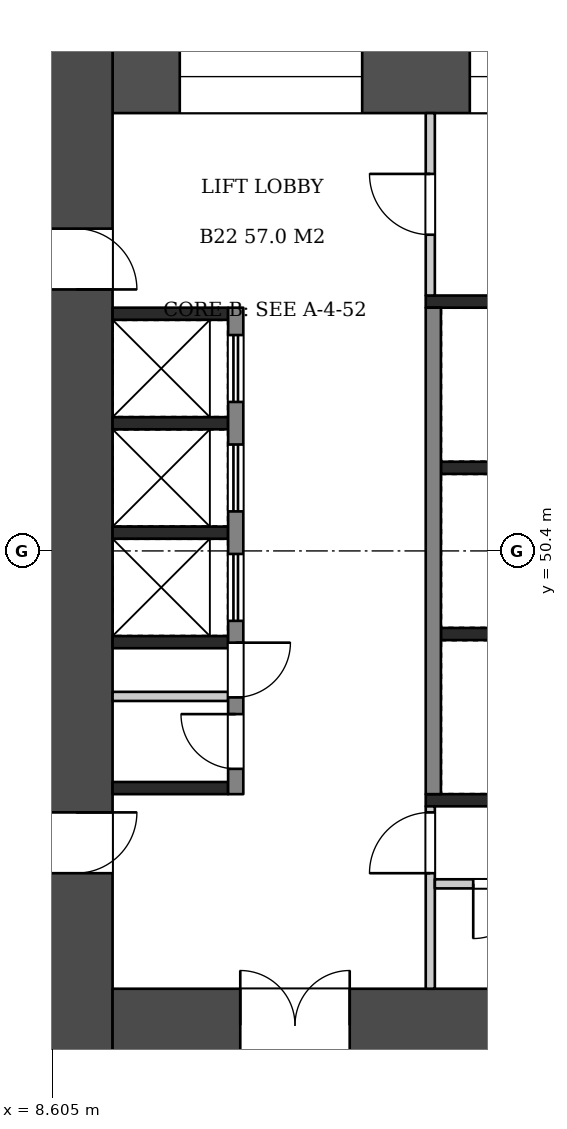
"""IFC4 building model, lengths in metres.
Left out: names, types, materials, properties, quantities, classifications, styles, units other than length and angle.
Written with IfcOpenShell. Run it as: python <this file> out.ifc"""

import sys

from ifc_helpers import new_model, si_unit, direction, frame, frame_2d, origin, place, context, subcontext, project, spatial, rectangle, extrude, element, fill, save


model = new_model("IFC4")
c1 = context("Model", 3, precision=1e-05, world=origin(), true_north=direction((0.0, 1.0)))
c2 = subcontext(c1, "Body", "Model", "MODEL_VIEW")
j1 = project(units=[si_unit("LENGTHUNIT", "METRE"), si_unit("PLANEANGLEUNIT", "RADIAN")], contexts=[c1])
p1 = place(None, origin())
s1 = spatial("IfcSite", under=j1, at=p1, CompositionType="ELEMENT")
p2 = place(p1, origin())
s2 = spatial("IfcBuilding", under=s1, at=p2, CompositionType="ELEMENT")
p3 = place(p2, frame((0.0, 0.0, 91.7)))
s3 = spatial("IfcBuildingStorey", under=s2, at=p3, CompositionType="ELEMENT", Elevation=91.7)
p4 = place(p3, frame((9.0, 58.8, 0.0), z_axis=(0.0, 0.0, 1.0), x_axis=(0.0, -1.0, 0.0)))
e1 = element("IfcWall", 1, at=p4, inside=s3, PredefinedType="SHEAR", context=c2, shape_type="SweptSolid", body=[
    extrude(rectangle(XDim=16.8, YDim=1.2, at=frame_2d((8.4, 0.0))), origin(), (0.0, 0.0, 1.0), 3.22),
])
p5 = place(p4, frame((3.1, 0.0, 0.0)))
e2 = element("IfcOpeningElement", 2, at=p5, cuts=e1, PredefinedType="OPENING", context=c2, shape_type="SweptSolid", body=[
    extrude(rectangle(XDim=1.0, YDim=2.1, at=frame_2d((0.5, 1.05))), frame((0.0, 0.61, 0.0), z_axis=(0.0, -1.0, 0.0), x_axis=(1.0, 0.0, 0.0)), (0.0, 0.0, 1.0), 1.22),
])
p6 = place(p4, frame((12.7, 0.0, 0.0)))
e3 = element("IfcOpeningElement", 3, at=p6, cuts=e1, PredefinedType="OPENING", context=c2, shape_type="SweptSolid", body=[
    extrude(rectangle(XDim=1.0, YDim=2.1, at=frame_2d((0.5, 1.05))), frame((0.0, 0.61, 0.0), z_axis=(0.0, -1.0, 0.0), x_axis=(1.0, 0.0, 0.0)), (0.0, 0.0, 1.0), 1.22),
])
p7 = place(p3, frame((9.6, 58.2, 0.0), z_axis=(0.0, 0.0, 1.0), x_axis=(1.0, 0.0, 0.0)))
e4 = element("IfcWall", 4, at=p7, inside=s3, PredefinedType="SHEAR", context=c2, shape_type="SweptSolid", body=[
    extrude(rectangle(XDim=14.4, YDim=1.2, at=frame_2d((7.2, 0.0))), origin(), (0.0, 0.0, 1.0), 3.22),
])
p8 = place(p7, frame((1.105, 0.0, 0.6)))
e5 = element("IfcOpeningElement", 5, at=p8, cuts=e4, PredefinedType="OPENING", context=c2, shape_type="SweptSolid", body=[
    extrude(rectangle(XDim=3.0, YDim=2.1, at=frame_2d((1.5, 1.05))), frame((0.0, 0.61, 0.0), z_axis=(0.0, -1.0, 0.0), x_axis=(1.0, 0.0, 0.0)), (0.0, 0.0, 1.0), 1.22),
])
p9 = place(p7, frame((5.875, 0.0, 0.6)))
e6 = element("IfcOpeningElement", 6, at=p9, cuts=e4, PredefinedType="OPENING", context=c2, shape_type="SweptSolid", body=[
    extrude(rectangle(XDim=2.4, YDim=2.1, at=frame_2d((1.2, 1.05))), frame((0.0, 0.61, 0.0), z_axis=(0.0, -1.0, 0.0), x_axis=(1.0, 0.0, 0.0)), (0.0, 0.0, 1.0), 1.22),
])
p10 = place(p7, frame((9.993, 0.0, 0.5)))
e7 = element("IfcOpeningElement", 7, at=p10, cuts=e4, PredefinedType="OPENING", context=c2, shape_type="SweptSolid", body=[
    extrude(rectangle(XDim=1.2, YDim=2.4, at=frame_2d((0.6, 1.2))), frame((0.0, 0.61, 0.0), z_axis=(0.0, -1.0, 0.0), x_axis=(1.0, 0.0, 0.0)), (0.0, 0.0, 1.0), 1.22),
])
p11 = place(p7, frame((12.197, 0.0, 0.5)))
e8 = element("IfcOpeningElement", 8, at=p11, cuts=e4, PredefinedType="OPENING", context=c2, shape_type="SweptSolid", body=[
    extrude(rectangle(XDim=1.2, YDim=2.4, at=frame_2d((0.6, 1.2))), frame((0.0, 0.61, 0.0), z_axis=(0.0, -1.0, 0.0), x_axis=(1.0, 0.0, 0.0)), (0.0, 0.0, 1.0), 1.22),
])
p12 = place(p3, frame((9.6, 42.6, 0.0), z_axis=(0.0, 0.0, 1.0), x_axis=(1.0, 0.0, 0.0)))
e9 = element("IfcWall", 9, at=p12, inside=s3, PredefinedType="SHEAR", context=c2, shape_type="SweptSolid", body=[
    extrude(rectangle(XDim=14.4, YDim=1.2, at=frame_2d((7.2, 0.0))), origin(), (0.0, 0.0, 1.0), 3.22),
])
p13 = place(p12, frame((2.1, 0.0, 0.0)))
e10 = element("IfcOpeningElement", 10, at=p13, cuts=e9, PredefinedType="OPENING", context=c2, shape_type="SweptSolid", body=[
    extrude(rectangle(XDim=1.8, YDim=2.1, at=frame_2d((0.9, 1.05))), frame((0.0, 0.61, 0.0), z_axis=(0.0, -1.0, 0.0), x_axis=(1.0, 0.0, 0.0)), (0.0, 0.0, 1.0), 1.22),
])
for number, where, z_axis, x_axis in (
    (11, (9.6, 54.3, 0.0), (0.0, 0.0, 1.0), (1.0, 0.0, 0.0)),
    (12, (9.6, 52.5, 0.0), (0.0, 0.0, 1.0), (1.0, 0.0, 0.0)),
    (13, (9.6, 50.7, 0.0), (0.0, 0.0, 1.0), (1.0, 0.0, 0.0)),
    (14, (9.6, 48.9, 0.0), (0.0, 0.0, 1.0), (1.0, 0.0, 0.0)),
    (15, (9.6, 46.5, 0.0), (0.0, 0.0, 1.0), (1.0, 0.0, 0.0)),
):
    element("IfcWall", number, at=place(p3, frame(where, z_axis=z_axis, x_axis=x_axis)), inside=s3, PredefinedType="SHEAR", context=c2, shape_type="SweptSolid", body=[
        extrude(rectangle(XDim=1.9, YDim=0.2, at=frame_2d((0.95, 0.0))), origin(), (0.0, 0.0, 1.0), 3.22),
    ])
p14 = place(p3, frame((9.6, 48.008, 0.0), z_axis=(0.0, 0.0, 1.0), x_axis=(1.0, 0.0, 0.0)))
e16 = element("IfcWall", 16, at=p14, inside=s3, PredefinedType="PARTITIONING", context=c2, shape_type="SweptSolid", body=[
    extrude(rectangle(XDim=1.9, YDim=0.15, at=frame_2d((0.95, 0.0))), origin(), (0.0, 0.0, 1.0), 3.22),
])
p15 = place(p3, frame((11.625, 54.4, 0.0), z_axis=(0.0, 0.0, 1.0), x_axis=(0.0, -1.0, 0.0)))
e17 = element("IfcWall", 17, at=p15, inside=s3, PredefinedType="SHEAR", context=c2, shape_type="SweptSolid", body=[
    extrude(rectangle(XDim=8.0, YDim=0.25, at=frame_2d((4.0, 0.0))), origin(), (0.0, 0.0, 1.0), 3.22),
])
p16 = place(p15, frame((0.45, 0.0, 0.0)))
e18 = element("IfcOpeningElement", 18, at=p16, cuts=e17, PredefinedType="OPENING", context=c2, shape_type="SweptSolid", body=[
    extrude(rectangle(XDim=1.1, YDim=2.1, at=frame_2d((0.55, 1.05))), frame((0.0, 0.135, 0.0), z_axis=(0.0, -1.0, 0.0), x_axis=(1.0, 0.0, 0.0)), (0.0, 0.0, 1.0), 0.27),
])
p17 = place(p15, frame((2.25, 0.0, 0.0)))
e19 = element("IfcOpeningElement", 19, at=p17, cuts=e17, PredefinedType="OPENING", context=c2, shape_type="SweptSolid", body=[
    extrude(rectangle(XDim=1.1, YDim=2.1, at=frame_2d((0.55, 1.05))), frame((0.0, 0.135, 0.0), z_axis=(0.0, -1.0, 0.0), x_axis=(1.0, 0.0, 0.0)), (0.0, 0.0, 1.0), 0.27),
])
p18 = place(p15, frame((4.05, 0.0, 0.0)))
e20 = element("IfcOpeningElement", 20, at=p18, cuts=e17, PredefinedType="OPENING", context=c2, shape_type="SweptSolid", body=[
    extrude(rectangle(XDim=1.1, YDim=2.1, at=frame_2d((0.55, 1.05))), frame((0.0, 0.135, 0.0), z_axis=(0.0, -1.0, 0.0), x_axis=(1.0, 0.0, 0.0)), (0.0, 0.0, 1.0), 0.27),
])
p19 = place(p15, frame((5.509, 0.0, 0.0)))
e21 = element("IfcOpeningElement", 21, at=p19, cuts=e17, PredefinedType="OPENING", context=c2, shape_type="SweptSolid", body=[
    extrude(rectangle(XDim=0.9, YDim=2.1, at=frame_2d((0.45, 1.05))), frame((0.0, 0.135, 0.0), z_axis=(0.0, -1.0, 0.0), x_axis=(1.0, 0.0, 0.0)), (0.0, 0.0, 1.0), 0.27),
])
p20 = place(p15, frame((6.684, 0.0, 0.0)))
e22 = element("IfcOpeningElement", 22, at=p20, cuts=e17, PredefinedType="OPENING", context=c2, shape_type="SweptSolid", body=[
    extrude(rectangle(XDim=0.9, YDim=2.1, at=frame_2d((0.45, 1.05))), frame((0.0, 0.135, 0.0), z_axis=(0.0, -1.0, 0.0), x_axis=(1.0, 0.0, 0.0)), (0.0, 0.0, 1.0), 0.27),
])
for number, where, z_axis, x_axis in (
    (23, (15.0, 51.767, 0.0), (0.0, 0.0, 1.0), (1.0, 0.0, 0.0)),
    (24, (15.0, 49.033, 0.0), (0.0, 0.0, 1.0), (1.0, 0.0, 0.0)),
):
    element("IfcWall", number, at=place(p3, frame(where, z_axis=z_axis, x_axis=x_axis)), inside=s3, PredefinedType="SHEAR", context=c2, shape_type="SweptSolid", body=[
        extrude(rectangle(XDim=1.9, YDim=0.2, at=frame_2d((0.95, 0.0))), origin(), (0.0, 0.0, 1.0), 3.22),
    ])
p21 = place(p3, frame((14.875, 54.4, 0.0), z_axis=(0.0, 0.0, 1.0), x_axis=(0.0, -1.0, 0.0)))
e25 = element("IfcWall", 25, at=p21, inside=s3, PredefinedType="SHEAR", context=c2, shape_type="SweptSolid", body=[
    extrude(rectangle(XDim=8.0, YDim=0.25, at=frame_2d((4.0, 0.0))), origin(), (0.0, 0.0, 1.0), 3.22),
])
p22 = place(p3, frame((14.75, 54.5, 0.0), z_axis=(0.0, 0.0, 1.0), x_axis=(1.0, 0.0, 0.0)))
e26 = element("IfcWall", 26, at=p22, inside=s3, PredefinedType="SHEAR", context=c2, shape_type="SweptSolid", body=[
    extrude(rectangle(XDim=2.4, YDim=0.2, at=frame_2d((1.2, 0.0))), origin(), (0.0, 0.0, 1.0), 3.22),
])
p23 = place(p3, frame((14.825, 57.6, 0.0), z_axis=(0.0, 0.0, 1.0), x_axis=(0.0, -1.0, 0.0)))
e27 = element("IfcWall", 27, at=p23, inside=s3, PredefinedType="PARTITIONING", context=c2, shape_type="SweptSolid", body=[
    extrude(rectangle(XDim=3.0, YDim=0.15, at=frame_2d((1.5, 0.0))), origin(), (0.0, 0.0, 1.0), 3.22),
])
p24 = place(p23, frame((1.0, 0.0, 0.0)))
e28 = element("IfcOpeningElement", 28, at=p24, cuts=e27, PredefinedType="OPENING", context=c2, shape_type="SweptSolid", body=[
    extrude(rectangle(XDim=1.0, YDim=2.1, at=frame_2d((0.5, 1.05))), frame((0.0, 0.085, 0.0), z_axis=(0.0, -1.0, 0.0), x_axis=(1.0, 0.0, 0.0)), (0.0, 0.0, 1.0), 0.17),
])
p25 = place(p3, frame((14.75, 46.3, 0.0), z_axis=(0.0, 0.0, 1.0), x_axis=(1.0, 0.0, 0.0)))
e29 = element("IfcWall", 29, at=p25, inside=s3, PredefinedType="SHEAR", context=c2, shape_type="SweptSolid", body=[
    extrude(rectangle(XDim=9.25, YDim=0.2, at=frame_2d((4.625, 0.0))), origin(), (0.0, 0.0, 1.0), 3.22),
])
p26 = place(p3, frame((14.825, 46.2, 0.0), z_axis=(0.0, 0.0, 1.0), x_axis=(0.0, -1.0, 0.0)))
e30 = element("IfcWall", 30, at=p26, inside=s3, PredefinedType="PARTITIONING", context=c2, shape_type="SweptSolid", body=[
    extrude(rectangle(XDim=3.0, YDim=0.15, at=frame_2d((1.5, 0.0))), origin(), (0.0, 0.0, 1.0), 3.22),
])
p27 = place(p26, frame((0.1, 0.0, 0.0)))
e31 = element("IfcOpeningElement", 31, at=p27, cuts=e30, PredefinedType="OPENING", context=c2, shape_type="SweptSolid", body=[
    extrude(rectangle(XDim=1.0, YDim=2.1, at=frame_2d((0.5, 1.05))), frame((0.0, 0.085, 0.0), z_axis=(0.0, -1.0, 0.0), x_axis=(1.0, 0.0, 0.0)), (0.0, 0.0, 1.0), 0.17),
])
p28 = place(p3, frame((14.9, 44.925, 0.0), z_axis=(0.0, 0.0, 1.0), x_axis=(1.0, 0.0, 0.0)))
e32 = element("IfcWall", 32, at=p28, inside=s3, PredefinedType="PARTITIONING", context=c2, shape_type="SweptSolid", body=[
    extrude(rectangle(XDim=9.1, YDim=0.15, at=frame_2d((4.55, 0.0))), origin(), (0.0, 0.0, 1.0), 3.22),
])
p29 = place(p28, frame((0.631, 0.0, 0.0)))
e33 = element("IfcOpeningElement", 33, at=p29, cuts=e32, PredefinedType="OPENING", context=c2, shape_type="SweptSolid", body=[
    extrude(rectangle(XDim=0.9, YDim=2.1, at=frame_2d((0.45, 1.05))), frame((0.0, 0.085, 0.0), z_axis=(0.0, -1.0, 0.0), x_axis=(1.0, 0.0, 0.0)), (0.0, 0.0, 1.0), 0.17),
])
p30 = place(p28, frame((2.944, 0.0, 0.0)))
e34 = element("IfcOpeningElement", 34, at=p30, cuts=e32, PredefinedType="OPENING", context=c2, shape_type="SweptSolid", body=[
    extrude(rectangle(XDim=0.9, YDim=2.1, at=frame_2d((0.45, 1.05))), frame((0.0, 0.085, 0.0), z_axis=(0.0, -1.0, 0.0), x_axis=(1.0, 0.0, 0.0)), (0.0, 0.0, 1.0), 0.17),
])
p31 = place(p28, frame((5.256, 0.0, 0.0)))
e35 = element("IfcOpeningElement", 35, at=p31, cuts=e32, PredefinedType="OPENING", context=c2, shape_type="SweptSolid", body=[
    extrude(rectangle(XDim=0.9, YDim=2.1, at=frame_2d((0.45, 1.05))), frame((0.0, 0.085, 0.0), z_axis=(0.0, -1.0, 0.0), x_axis=(1.0, 0.0, 0.0)), (0.0, 0.0, 1.0), 0.17),
])
p32 = place(p28, frame((7.569, 0.0, 0.0)))
e36 = element("IfcOpeningElement", 36, at=p32, cuts=e32, PredefinedType="OPENING", context=c2, shape_type="SweptSolid", body=[
    extrude(rectangle(XDim=0.9, YDim=2.1, at=frame_2d((0.45, 1.05))), frame((0.0, 0.085, 0.0), z_axis=(0.0, -1.0, 0.0), x_axis=(1.0, 0.0, 0.0)), (0.0, 0.0, 1.0), 0.17),
])
p33 = place(p5, origin())
e37 = element("IfcDoor", 37, at=p33, inside=s3, OperationType="SINGLE_SWING_RIGHT", PredefinedType="DOOR", context=c2, shape_type="SweptSolid", body=[
    extrude(rectangle(XDim=1.0, YDim=2.1, at=frame_2d((0.5, 1.05))), frame((0.0, 0.025, 0.0), z_axis=(0.0, -1.0, 0.0), x_axis=(1.0, 0.0, 0.0)), (0.0, 0.0, 1.0), 0.05),
])
fill(e2, e37)
p34 = place(p6, origin())
e38 = element("IfcDoor", 38, at=p34, inside=s3, OperationType="SINGLE_SWING_LEFT", PredefinedType="DOOR", context=c2, shape_type="SweptSolid", body=[
    extrude(rectangle(XDim=1.0, YDim=2.1, at=frame_2d((0.5, 1.05))), frame((0.0, 0.025, 0.0), z_axis=(0.0, -1.0, 0.0), x_axis=(1.0, 0.0, 0.0)), (0.0, 0.0, 1.0), 0.05),
])
fill(e3, e38)
p35 = place(p13, origin())
e39 = element("IfcDoor", 39, at=p35, inside=s3, OperationType="DOUBLE_DOOR_SINGLE_SWING", PredefinedType="DOOR", context=c2, shape_type="SweptSolid", body=[
    extrude(rectangle(XDim=1.8, YDim=2.1, at=frame_2d((0.9, 1.05))), frame((0.0, 0.025, 0.0), z_axis=(0.0, -1.0, 0.0), x_axis=(1.0, 0.0, 0.0)), (0.0, 0.0, 1.0), 0.05),
])
fill(e10, e39)
p36 = place(p16, origin())
e40 = element("IfcDoor", 40, at=p36, inside=s3, OperationType="DOUBLE_DOOR_SLIDING", PredefinedType="DOOR", context=c2, shape_type="SweptSolid", body=[
    extrude(rectangle(XDim=1.1, YDim=2.1, at=frame_2d((0.55, 1.05))), frame((0.0, 0.025, 0.0), z_axis=(0.0, -1.0, 0.0), x_axis=(1.0, 0.0, 0.0)), (0.0, 0.0, 1.0), 0.05),
])
fill(e18, e40)
p37 = place(p17, origin())
e41 = element("IfcDoor", 41, at=p37, inside=s3, OperationType="DOUBLE_DOOR_SLIDING", PredefinedType="DOOR", context=c2, shape_type="SweptSolid", body=[
    extrude(rectangle(XDim=1.1, YDim=2.1, at=frame_2d((0.55, 1.05))), frame((0.0, 0.025, 0.0), z_axis=(0.0, -1.0, 0.0), x_axis=(1.0, 0.0, 0.0)), (0.0, 0.0, 1.0), 0.05),
])
fill(e19, e41)
p38 = place(p18, origin())
e42 = element("IfcDoor", 42, at=p38, inside=s3, OperationType="DOUBLE_DOOR_SLIDING", PredefinedType="DOOR", context=c2, shape_type="SweptSolid", body=[
    extrude(rectangle(XDim=1.1, YDim=2.1, at=frame_2d((0.55, 1.05))), frame((0.0, 0.025, 0.0), z_axis=(0.0, -1.0, 0.0), x_axis=(1.0, 0.0, 0.0)), (0.0, 0.0, 1.0), 0.05),
])
fill(e20, e42)
p39 = place(p19, origin())
e43 = element("IfcDoor", 43, at=p39, inside=s3, OperationType="SINGLE_SWING_LEFT", PredefinedType="DOOR", context=c2, shape_type="SweptSolid", body=[
    extrude(rectangle(XDim=0.9, YDim=2.1, at=frame_2d((0.45, 1.05))), frame((0.0, 0.025, 0.0), z_axis=(0.0, -1.0, 0.0), x_axis=(1.0, 0.0, 0.0)), (0.0, 0.0, 1.0), 0.05),
])
fill(e21, e43)
p40 = place(p20, frame((0.9, 0.0, 0.0), z_axis=(0.0, 0.0, 1.0), x_axis=(-1.0, 0.0, 0.0)))
e44 = element("IfcDoor", 44, at=p40, inside=s3, OperationType="SINGLE_SWING_RIGHT", PredefinedType="DOOR", context=c2, shape_type="SweptSolid", body=[
    extrude(rectangle(XDim=0.9, YDim=2.1, at=frame_2d((0.45, 1.05))), frame((0.0, 0.025, 0.0), z_axis=(0.0, -1.0, 0.0), x_axis=(1.0, 0.0, 0.0)), (0.0, 0.0, 1.0), 0.05),
])
fill(e22, e44)
p41 = place(p24, frame((1.0, 0.0, 0.0), z_axis=(0.0, 0.0, 1.0), x_axis=(-1.0, 0.0, 0.0)))
e45 = element("IfcDoor", 45, at=p41, inside=s3, OperationType="SINGLE_SWING_RIGHT", PredefinedType="DOOR", context=c2, shape_type="SweptSolid", body=[
    extrude(rectangle(XDim=1.0, YDim=2.1, at=frame_2d((0.5, 1.05))), frame((0.0, 0.025, 0.0), z_axis=(0.0, -1.0, 0.0), x_axis=(1.0, 0.0, 0.0)), (0.0, 0.0, 1.0), 0.05),
])
fill(e28, e45)
p42 = place(p27, frame((1.0, 0.0, 0.0), z_axis=(0.0, 0.0, 1.0), x_axis=(-1.0, 0.0, 0.0)))
e46 = element("IfcDoor", 46, at=p42, inside=s3, OperationType="SINGLE_SWING_LEFT", PredefinedType="DOOR", context=c2, shape_type="SweptSolid", body=[
    extrude(rectangle(XDim=1.0, YDim=2.1, at=frame_2d((0.5, 1.05))), frame((0.0, 0.025, 0.0), z_axis=(0.0, -1.0, 0.0), x_axis=(1.0, 0.0, 0.0)), (0.0, 0.0, 1.0), 0.05),
])
fill(e31, e46)
p43 = place(p29, frame((0.9, 0.0, 0.0), z_axis=(0.0, 0.0, 1.0), x_axis=(-1.0, 0.0, 0.0)))
e47 = element("IfcDoor", 47, at=p43, inside=s3, OperationType="SINGLE_SWING_RIGHT", PredefinedType="DOOR", context=c2, shape_type="SweptSolid", body=[
    extrude(rectangle(XDim=0.9, YDim=2.1, at=frame_2d((0.45, 1.05))), frame((0.0, 0.025, 0.0), z_axis=(0.0, -1.0, 0.0), x_axis=(1.0, 0.0, 0.0)), (0.0, 0.0, 1.0), 0.05),
])
fill(e33, e47)
p44 = place(p8, origin())
e48 = element("IfcWindow", 48, at=p44, inside=s3, PartitioningType="SINGLE_PANEL", PredefinedType="WINDOW", context=c2, shape_type="SweptSolid", body=[
    extrude(rectangle(XDim=3.0, YDim=2.1, at=frame_2d((1.5, 1.05))), frame((0.0, 0.03, 0.0), z_axis=(0.0, -1.0, 0.0), x_axis=(1.0, 0.0, 0.0)), (0.0, 0.0, 1.0), 0.06),
])
fill(e5, e48)
p45 = place(p9, origin())
e49 = element("IfcWindow", 49, at=p45, inside=s3, PartitioningType="SINGLE_PANEL", PredefinedType="WINDOW", context=c2, shape_type="SweptSolid", body=[
    extrude(rectangle(XDim=2.4, YDim=2.1, at=frame_2d((1.2, 1.05))), frame((0.0, 0.03, 0.0), z_axis=(0.0, -1.0, 0.0), x_axis=(1.0, 0.0, 0.0)), (0.0, 0.0, 1.0), 0.06),
])
fill(e6, e49)
save(model, sys.argv[1])
